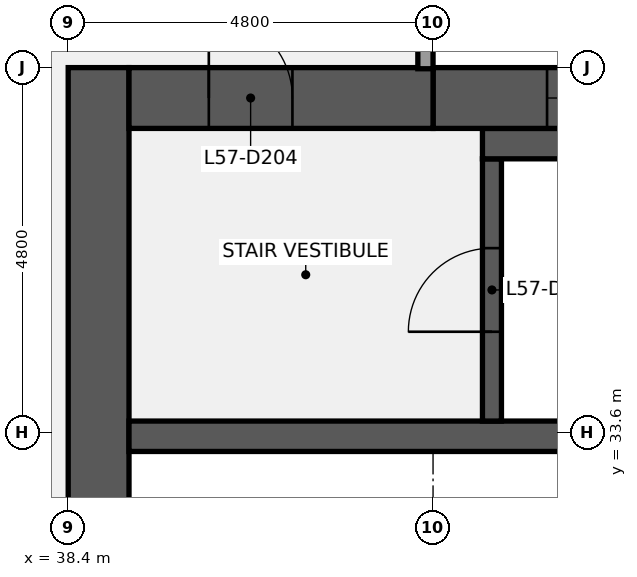
"""IFC4 building model, lengths in metres.
Left out: names, types, materials, properties, quantities, classifications, styles, units other than length and angle.
Written with IfcOpenShell. Run it as: python <this file> out.ifc"""

import sys

from ifc_helpers import new_model, si_unit, direction, frame, frame_2d, origin, place, context, subcontext, project, spatial, rectangle, extrude, element, fill, save


model = new_model("IFC4")
c1 = context("Model", 3, precision=1e-05, world=origin(), true_north=direction((0.0, 1.0)))
c2 = subcontext(c1, "Body", "Model", "MODEL_VIEW")
j1 = project(units=[si_unit("LENGTHUNIT", "METRE"), si_unit("PLANEANGLEUNIT", "RADIAN")], contexts=[c1])
p1 = place(None, origin())
s1 = spatial("IfcSite", under=j1, at=p1, CompositionType="ELEMENT")
p2 = place(p1, origin())
s2 = spatial("IfcBuilding", under=s1, at=p2, CompositionType="ELEMENT")
p3 = place(p2, frame((0.0, 0.0, 257.2)))
s3 = spatial("IfcBuildingStorey", under=s2, at=p3, CompositionType="ELEMENT", Elevation=257.2)
p4 = place(p3, frame((38.8, 9.6, 0.0), z_axis=(0.0, 0.0, 1.0), x_axis=(0.0, 1.0, 0.0)))
e1 = element("IfcWall", 1, at=p4, inside=s3, PredefinedType="SHEAR", context=c2, shape_type="SweptSolid", body=[
    extrude(rectangle(XDim=28.8, YDim=0.8, at=frame_2d((14.4, 0.0))), origin(), (0.0, 0.0, 1.0), 3.84),
])
p5 = place(p4, frame((8.7, 0.0, 0.0)))
e2 = element("IfcOpeningElement", 2, at=p5, cuts=e1, PredefinedType="OPENING", context=c2, shape_type="SweptSolid", body=[
    extrude(rectangle(XDim=1.8, YDim=2.1, at=frame_2d((0.9, 1.05))), frame((0.0, 0.41, 0.0), z_axis=(0.0, -1.0, 0.0), x_axis=(1.0, 0.0, 0.0)), (0.0, 0.0, 1.0), 0.82),
])
p6 = place(p4, frame((18.3, 0.0, 0.0)))
e3 = element("IfcOpeningElement", 3, at=p6, cuts=e1, PredefinedType="OPENING", context=c2, shape_type="SweptSolid", body=[
    extrude(rectangle(XDim=1.8, YDim=2.1, at=frame_2d((0.9, 1.05))), frame((0.0, 0.41, 0.0), z_axis=(0.0, -1.0, 0.0), x_axis=(1.0, 0.0, 0.0)), (0.0, 0.0, 1.0), 0.82),
])
p7 = place(p3, frame((39.2, 33.55, 0.0), z_axis=(0.0, 0.0, 1.0), x_axis=(1.0, 0.0, 0.0)))
e4 = element("IfcWall", 4, at=p7, inside=s3, PredefinedType="SHEAR", context=c2, shape_type="SweptSolid", body=[
    extrude(rectangle(XDim=17.6, YDim=0.4, at=frame_2d((8.8, 0.0))), origin(), (0.0, 0.0, 1.0), 3.84),
])
p8 = place(p3, frame((43.975, 33.75, 0.0), z_axis=(0.0, 0.0, 1.0), x_axis=(0.0, 1.0, 0.0)))
e5 = element("IfcWall", 5, at=p8, inside=s3, PredefinedType="SHEAR", context=c2, shape_type="SweptSolid", body=[
    extrude(rectangle(XDim=3.45, YDim=0.25, at=frame_2d((1.725, 0.0))), origin(), (0.0, 0.0, 1.0), 3.84),
])
p9 = place(p8, frame((1.175, 0.0, 0.0)))
e6 = element("IfcOpeningElement", 6, at=p9, cuts=e5, PredefinedType="OPENING", context=c2, shape_type="SweptSolid", body=[
    extrude(rectangle(XDim=1.1, YDim=2.1, at=frame_2d((0.55, 1.05))), frame((0.0, 0.135, 0.0), z_axis=(0.0, -1.0, 0.0), x_axis=(1.0, 0.0, 0.0)), (0.0, 0.0, 1.0), 0.27),
])
p10 = place(p3, frame((43.85, 37.4, 0.0), z_axis=(0.0, 0.0, 1.0), x_axis=(1.0, 0.0, 0.0)))
e7 = element("IfcWall", 7, at=p10, inside=s3, PredefinedType="SHEAR", context=c2, shape_type="SweptSolid", body=[
    extrude(rectangle(XDim=7.5, YDim=0.4, at=frame_2d((3.75, 0.0))), origin(), (0.0, 0.0, 1.0), 3.84),
])
p11 = place(p3, frame((43.2, 38.0, 0.0), z_axis=(0.0, 0.0, 1.0), x_axis=(1.0, 0.0, 0.0)))
e8 = element("IfcWall", 8, at=p11, inside=s3, PredefinedType="SHEAR", context=c2, shape_type="SweptSolid", body=[
    extrude(rectangle(XDim=13.6, YDim=0.8, at=frame_2d((6.8, 0.0))), origin(), (0.0, 0.0, 1.0), 3.84),
])
p12 = place(p11, frame((6.3, 0.0, 0.9)))
e9 = element("IfcOpeningElement", 9, at=p12, cuts=e8, PredefinedType="OPENING", context=c2, shape_type="SweptSolid", body=[
    extrude(rectangle(XDim=1.8, YDim=1.5, at=frame_2d((0.9, 0.75))), frame((0.0, 0.41, 0.0), z_axis=(0.0, -1.0, 0.0), x_axis=(1.0, 0.0, 0.0)), (0.0, 0.0, 1.0), 0.82),
])
p13 = place(p11, frame((1.5, 0.0, 0.9)))
e10 = element("IfcOpeningElement", 10, at=p13, cuts=e8, PredefinedType="OPENING", context=c2, shape_type="SweptSolid", body=[
    extrude(rectangle(XDim=1.8, YDim=1.5, at=frame_2d((0.9, 0.75))), frame((0.0, 0.41, 0.0), z_axis=(0.0, -1.0, 0.0), x_axis=(1.0, 0.0, 0.0)), (0.0, 0.0, 1.0), 0.82),
])
p14 = place(p3, frame((39.2, 38.0, 0.0), z_axis=(0.0, 0.0, 1.0), x_axis=(1.0, 0.0, 0.0)))
e11 = element("IfcWall", 11, at=p14, inside=s3, PredefinedType="SHEAR", context=c2, shape_type="SweptSolid", body=[
    extrude(rectangle(XDim=4.0, YDim=0.8, at=frame_2d((2.0, 0.0))), origin(), (0.0, 0.0, 1.0), 3.84),
])
p15 = place(p14, frame((1.05, 0.0, 0.0)))
e12 = element("IfcOpeningElement", 12, at=p15, cuts=e11, PredefinedType="OPENING", context=c2, shape_type="SweptSolid", body=[
    extrude(rectangle(XDim=1.1, YDim=2.1, at=frame_2d((0.55, 1.05))), frame((0.0, 0.41, 0.0), z_axis=(0.0, -1.0, 0.0), x_axis=(1.0, 0.0, 0.0)), (0.0, 0.0, 1.0), 0.82),
])
p16 = place(p3, frame((43.1, 38.385, 0.0), z_axis=(0.0, 0.0, 1.0), x_axis=(0.0, 1.0, 0.0)))
e13 = element("IfcWall", 13, at=p16, inside=s3, PredefinedType="SOLIDWALL", context=c2, shape_type="SweptSolid", body=[
    extrude(rectangle(XDim=2.415, YDim=0.2, at=frame_2d((1.208, 0.0))), origin(), (0.0, 0.0, 1.0), 3.296),
])
p17 = place(p16, frame((0.5, 0.0, 0.0)))
e14 = element("IfcOpeningElement", 14, at=p17, cuts=e13, PredefinedType="OPENING", context=c2, shape_type="SweptSolid", body=[
    extrude(rectangle(XDim=1.8, YDim=2.1, at=frame_2d((0.9, 1.05))), frame((0.0, 0.11, 0.0), z_axis=(0.0, -1.0, 0.0), x_axis=(1.0, 0.0, 0.0)), (0.0, 0.0, 1.0), 0.22),
])
p18 = place(p9, origin())
e15 = element("IfcDoor", 15, at=p18, inside=s3, OperationType="SINGLE_SWING_LEFT", PredefinedType="DOOR", context=c2, shape_type="SweptSolid", body=[
    extrude(rectangle(XDim=1.1, YDim=2.1, at=frame_2d((0.55, 1.05))), frame((0.0, 0.025, 0.0), z_axis=(0.0, -1.0, 0.0), x_axis=(1.0, 0.0, 0.0)), (0.0, 0.0, 1.0), 0.05),
])
fill(e6, e15)
p19 = place(p15, origin())
e16 = element("IfcDoor", 16, at=p19, inside=s3, OperationType="SINGLE_SWING_LEFT", PredefinedType="DOOR", context=c2, shape_type="SweptSolid", body=[
    extrude(rectangle(XDim=1.1, YDim=2.1, at=frame_2d((0.55, 1.05))), frame((0.0, 0.025, 0.0), z_axis=(0.0, -1.0, 0.0), x_axis=(1.0, 0.0, 0.0)), (0.0, 0.0, 1.0), 0.05),
])
fill(e12, e16)
p20 = place(p13, origin())
e17 = element("IfcWindow", 17, at=p20, inside=s3, PartitioningType="SINGLE_PANEL", PredefinedType="WINDOW", context=c2, shape_type="SweptSolid", body=[
    extrude(rectangle(XDim=1.8, YDim=1.5, at=frame_2d((0.9, 0.75))), frame((0.0, 0.03, 0.0), z_axis=(0.0, -1.0, 0.0), x_axis=(1.0, 0.0, 0.0)), (0.0, 0.0, 1.0), 0.06),
])
fill(e10, e17)
save(model, sys.argv[1])
